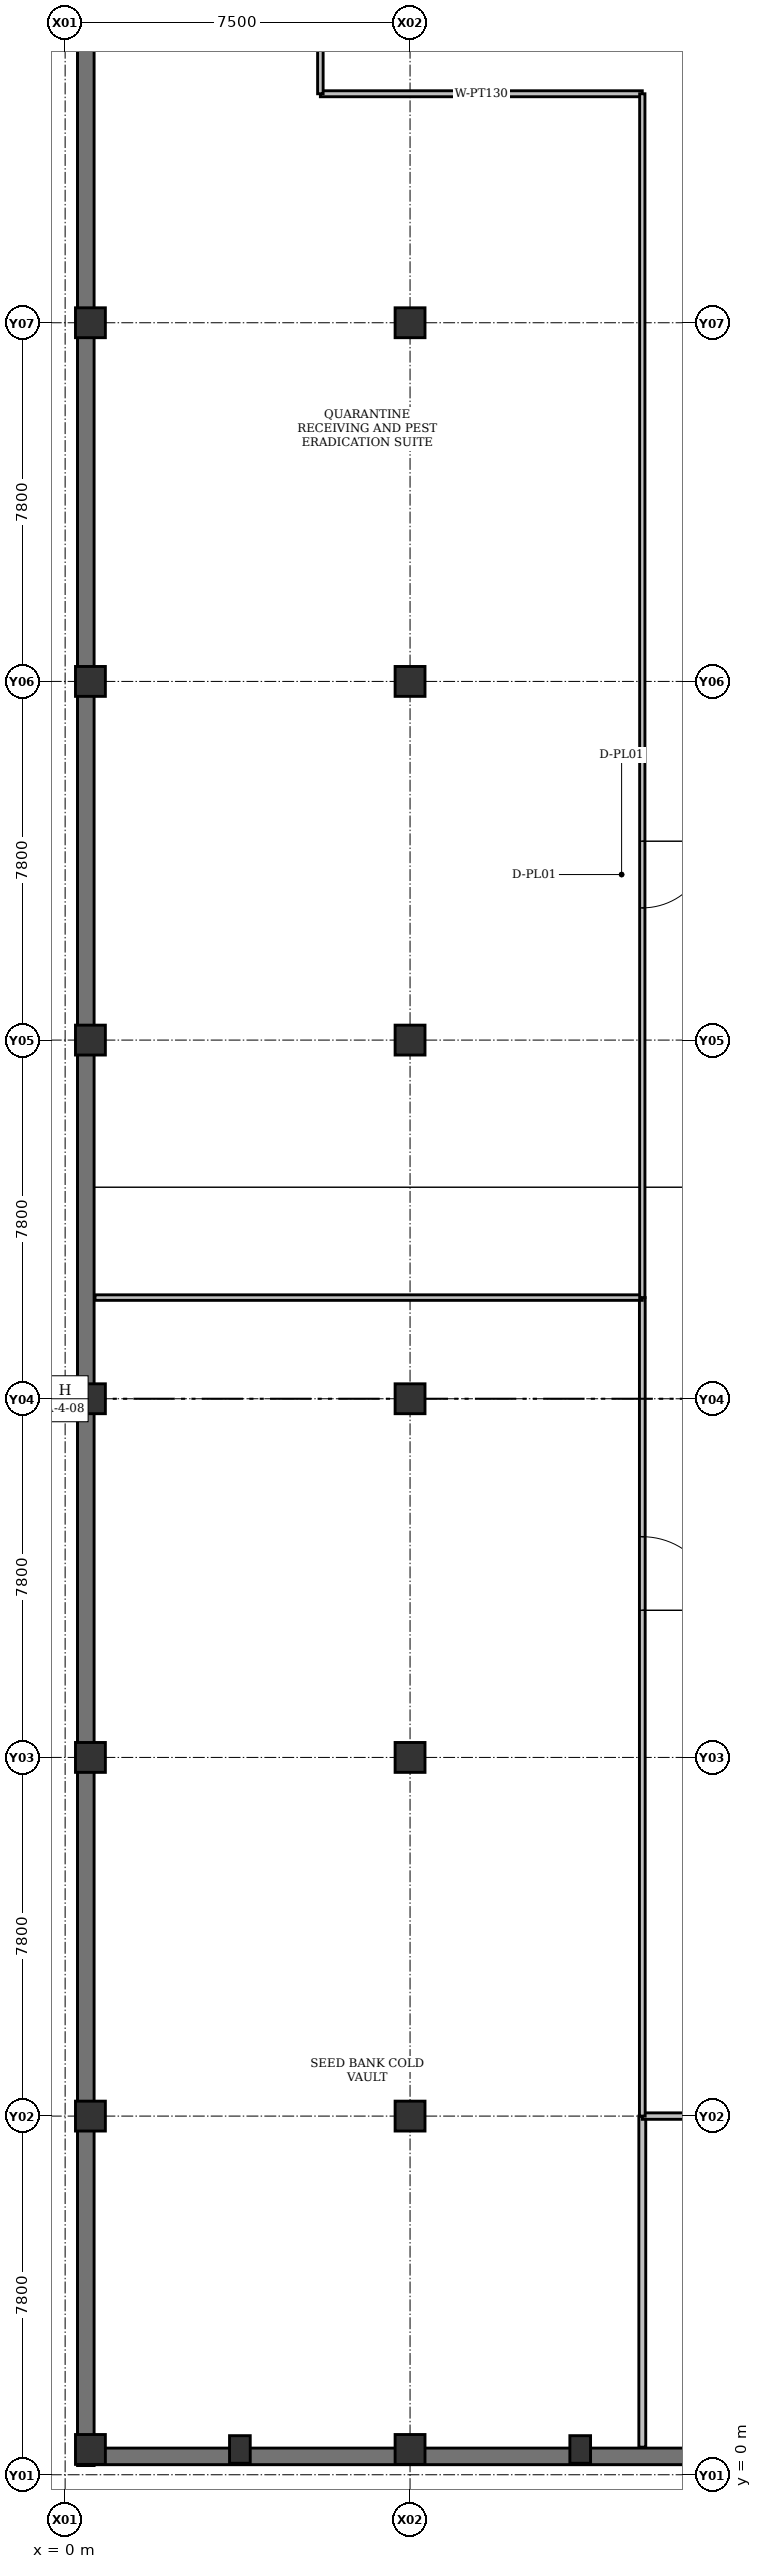
"""IFC4 building model, lengths in metres.
Left out: names, types, materials, properties, quantities, classifications, styles, units other than length and angle.
Written with IfcOpenShell. Run it as: python <this file> out.ifc"""

import sys

from ifc_helpers import new_model, si_unit, direction, frame, frame_2d, origin, origin_2d, place, context, subcontext, project, spatial, rectangle, extrude, element, fill, save


model = new_model("IFC4")
c1 = context("Model", 3, precision=1e-05, world=origin(), true_north=direction((0.0, 1.0)))
c2 = subcontext(c1, "Body", "Model", "MODEL_VIEW")
j1 = project(units=[si_unit("LENGTHUNIT", "METRE"), si_unit("PLANEANGLEUNIT", "RADIAN")], contexts=[c1])
p1 = place(None, origin())
s1 = spatial("IfcSite", under=j1, at=p1, CompositionType="ELEMENT")
p2 = place(p1, origin())
s2 = spatial("IfcBuilding", under=s1, at=p2, CompositionType="ELEMENT")
p3 = place(p2, frame((0.0, 0.0, -4.2)))
s3 = spatial("IfcBuildingStorey", under=s2, at=p3, CompositionType="ELEMENT", Elevation=-4.2)
for number, where, z_axis, x_axis in (
    (1, (0.55, 0.55, 0.0), (0.0, 0.0, 1.0), (1.0, 0.0, 0.0)),
    (2, (0.55, 7.8, 0.0), (0.0, 0.0, 1.0), (1.0, 0.0, 0.0)),
    (3, (0.55, 15.6, 0.0), (0.0, 0.0, 1.0), (1.0, 0.0, 0.0)),
    (4, (0.55, 23.4, 0.0), (0.0, 0.0, 1.0), (1.0, 0.0, 0.0)),
    (5, (0.55, 31.2, 0.0), (0.0, 0.0, 1.0), (1.0, 0.0, 0.0)),
    (6, (0.55, 39.0, 0.0), (0.0, 0.0, 1.0), (1.0, 0.0, 0.0)),
    (7, (0.55, 46.8, 0.0), (0.0, 0.0, 1.0), (1.0, 0.0, 0.0)),
    (8, (7.5, 0.55, 0.0), (0.0, 0.0, 1.0), (1.0, 0.0, 0.0)),
    (9, (7.5, 7.8, 0.0), (0.0, 0.0, 1.0), (1.0, 0.0, 0.0)),
    (10, (7.5, 15.6, 0.0), (0.0, 0.0, 1.0), (1.0, 0.0, 0.0)),
    (11, (7.5, 23.4, 0.0), (0.0, 0.0, 1.0), (1.0, 0.0, 0.0)),
    (12, (7.5, 31.2, 0.0), (0.0, 0.0, 1.0), (1.0, 0.0, 0.0)),
    (13, (7.5, 39.0, 0.0), (0.0, 0.0, 1.0), (1.0, 0.0, 0.0)),
    (14, (7.5, 46.8, 0.0), (0.0, 0.0, 1.0), (1.0, 0.0, 0.0)),
):
    element("IfcColumn", number, at=place(p3, frame(where, z_axis=z_axis, x_axis=x_axis)), inside=s3, PredefinedType="COLUMN", context=c2, shape_type="SweptSolid", body=[
        extrude(rectangle(XDim=0.65, YDim=0.65, at=origin_2d()), origin(), (0.0, 0.0, 1.0), 4.2),
    ])
for number, where, z_axis, x_axis in (
    (15, (3.8, 0.55, 0.0), (0.0, 0.0, 1.0), (1.0, 0.0, 0.0)),
    (16, (11.2, 0.55, 0.0), (0.0, 0.0, 1.0), (1.0, 0.0, 0.0)),
):
    element("IfcColumn", number, at=place(p3, frame(where, z_axis=z_axis, x_axis=x_axis)), inside=s3, PredefinedType="PILASTER", context=c2, shape_type="SweptSolid", body=[
        extrude(rectangle(XDim=0.45, YDim=0.6, at=origin_2d()), origin(), (0.0, 0.0, 1.0), 4.2),
    ])
p4 = place(p3, frame((0.45, 0.2, 0.0), z_axis=(0.0, 0.0, 1.0), x_axis=(0.0, 1.0, 0.0)))
e17 = element("IfcWall", 17, at=p4, inside=s3, PredefinedType="USERDEFINED", context=c2, shape_type="SweptSolid", body=[
    extrude(rectangle(XDim=113.6, YDim=0.36, at=frame_2d((56.8, 0.0))), origin(), (0.0, 0.0, 1.0), 3.95),
])
p5 = place(p3, frame((29.6, 0.4, 0.0), z_axis=(0.0, 0.0, 1.0), x_axis=(-1.0, 0.0, 0.0)))
e18 = element("IfcWall", 18, at=p5, inside=s3, PredefinedType="USERDEFINED", context=c2, shape_type="SweptSolid", body=[
    extrude(rectangle(XDim=28.95, YDim=0.36, at=frame_2d((14.475, 0.0))), origin(), (0.0, 0.0, 1.0), 3.95),
])
p6 = place(p3, frame((5.55, 51.78, 0.0), z_axis=(0.0, 0.0, 1.0), x_axis=(1.0, 0.0, 0.0)))
e19 = element("IfcWall", 19, at=p6, inside=s3, PredefinedType="PARTITIONING", context=c2, shape_type="SweptSolid", body=[
    extrude(rectangle(XDim=7.0, YDim=0.13, at=frame_2d((3.5, 0.0))), origin(), (0.0, 0.0, 1.0), 3.477),
])
p7 = place(p3, frame((5.55, 63.0, 0.0), z_axis=(0.0, 0.0, 1.0), x_axis=(0.0, -1.0, 0.0)))
e20 = element("IfcWall", 20, at=p7, inside=s3, PredefinedType="PARTITIONING", context=c2, shape_type="SweptSolid", body=[
    extrude(rectangle(XDim=11.22, YDim=0.12, at=frame_2d((5.61, 0.0))), origin(), (0.0, 0.0, 1.0), 3.401),
])
p8 = place(p3, frame((12.55, 0.6, 0.0), z_axis=(0.0, 0.0, 1.0), x_axis=(0.0, 1.0, 0.0)))
e21 = element("IfcWall", 21, at=p8, inside=s3, PredefinedType="PARTITIONING", context=c2, shape_type="SweptSolid", body=[
    extrude(rectangle(XDim=7.2, YDim=0.15, at=frame_2d((3.6, 0.0))), origin(), (0.0, 0.0, 1.0), 3.401),
])
p9 = place(p3, frame((12.55, 7.8, 0.0), z_axis=(0.0, 0.0, 1.0), x_axis=(1.0, 0.0, 0.0)))
e22 = element("IfcWall", 22, at=p9, inside=s3, PredefinedType="PARTITIONING", context=c2, shape_type="SweptSolid", body=[
    extrude(rectangle(XDim=9.28, YDim=0.14, at=frame_2d((4.64, 0.0))), origin(), (0.0, 0.0, 1.0), 3.401),
])
p10 = place(p3, frame((12.55, 25.6, 0.0), z_axis=(0.0, 0.0, 1.0), x_axis=(0.0, -1.0, 0.0)))
e23 = element("IfcWall", 23, at=p10, inside=s3, PredefinedType="PARTITIONING", context=c2, shape_type="SweptSolid", body=[
    extrude(rectangle(XDim=17.8, YDim=0.125, at=frame_2d((8.9, 0.0))), origin(), (0.0, 0.0, 1.0), 3.401),
])
p11 = place(p10, frame((5.2, 0.0, 0.0)))
e24 = element("IfcOpeningElement", 24, at=p11, cuts=e23, PredefinedType="OPENING", context=c2, shape_type="SweptSolid", body=[
    extrude(rectangle(XDim=1.6, YDim=2.25, at=frame_2d((0.8, 1.125))), frame((0.0, 0.062, 0.0), z_axis=(0.0, -1.0, 0.0), x_axis=(1.0, 0.0, 0.0)), (0.0, 0.0, 1.0), 0.125),
])
p12 = place(p3, frame((0.65, 25.6, 0.0), z_axis=(0.0, 0.0, 1.0), x_axis=(1.0, 0.0, 0.0)))
e25 = element("IfcWall", 25, at=p12, inside=s3, PredefinedType="PARTITIONING", context=c2, shape_type="SweptSolid", body=[
    extrude(rectangle(XDim=11.9, YDim=0.12, at=frame_2d((5.95, 0.0))), origin(), (0.0, 0.0, 1.0), 3.477),
])
p13 = place(p3, frame((12.55, 51.78, 0.0), z_axis=(0.0, 0.0, 1.0), x_axis=(0.0, -1.0, 0.0)))
e26 = element("IfcWall", 26, at=p13, inside=s3, PredefinedType="PARTITIONING", context=c2, shape_type="SweptSolid", body=[
    extrude(rectangle(XDim=26.18, YDim=0.115, at=frame_2d((13.09, 0.0))), origin(), (0.0, 0.0, 1.0), 3.401),
])
p14 = place(p13, frame((16.255, 0.0, 0.0)))
e27 = element("IfcOpeningElement", 27, at=p14, cuts=e26, PredefinedType="OPENING", context=c2, shape_type="SweptSolid", body=[
    extrude(rectangle(XDim=1.45, YDim=2.2, at=frame_2d((0.725, 1.1))), frame((0.0, 0.058, 0.0), z_axis=(0.0, -1.0, 0.0), x_axis=(1.0, 0.0, 0.0)), (0.0, 0.0, 1.0), 0.115),
])
p15 = place(p11, origin())
e28 = element("IfcDoor", 28, at=p15, inside=s3, OperationType="SINGLE_SWING_RIGHT", PredefinedType="DOOR", context=c2, shape_type="SweptSolid", body=[
    extrude(rectangle(XDim=1.6, YDim=2.25, at=frame_2d((0.8, 1.125))), frame((0.0, 0.025, 0.0), z_axis=(0.0, -1.0, 0.0), x_axis=(1.0, 0.0, 0.0)), (0.0, 0.0, 1.0), 0.05),
])
fill(e24, e28)
p16 = place(p14, origin())
e29 = element("IfcDoor", 29, at=p16, inside=s3, OperationType="SINGLE_SWING_LEFT", PredefinedType="DOOR", context=c2, shape_type="SweptSolid", body=[
    extrude(rectangle(XDim=1.45, YDim=2.2, at=frame_2d((0.725, 1.1))), frame((0.0, 0.025, 0.0), z_axis=(0.0, -1.0, 0.0), x_axis=(1.0, 0.0, 0.0)), (0.0, 0.0, 1.0), 0.05),
])
fill(e27, e29)
save(model, sys.argv[1])
